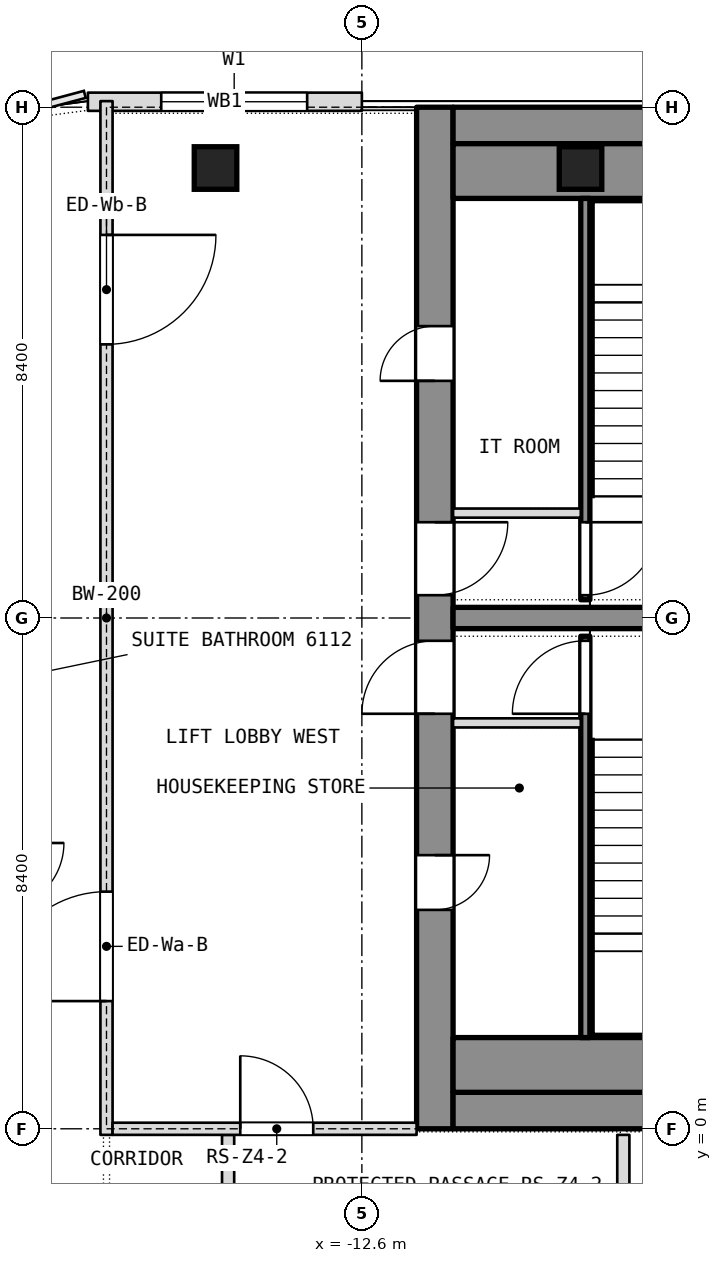
"""IFC4 building model, lengths in metres.
Left out: names, types, materials, properties, quantities, classifications, styles, units other than length and angle.
Written with IfcOpenShell. Run it as: python <this file> out.ifc"""

import sys

from ifc_helpers import new_model, si_unit, direction, frame, frame_2d, origin, origin_2d, place, context, subcontext, project, spatial, rectangle, extrude, element, fill, save


model = new_model("IFC4")
c1 = context("Model", 3, precision=1e-05, world=origin(), true_north=direction((0.0, 1.0)))
c2 = subcontext(c1, "Body", "Model", "MODEL_VIEW")
j1 = project(units=[si_unit("LENGTHUNIT", "METRE"), si_unit("PLANEANGLEUNIT", "RADIAN")], contexts=[c1])
p1 = place(None, origin())
s1 = spatial("IfcSite", under=j1, at=p1, CompositionType="ELEMENT")
p2 = place(p1, origin())
s2 = spatial("IfcBuilding", under=s1, at=p2, CompositionType="ELEMENT")
p3 = place(p2, frame((0.0, 0.0, 266.9)))
s3 = spatial("IfcBuildingStorey", under=s2, at=p3, CompositionType="ELEMENT", Elevation=266.9)
p4 = place(p3, frame((-11.4, 0.0, 0.0), z_axis=(0.0, 0.0, 1.0), x_axis=(0.0, 1.0, 0.0)))
e1 = element("IfcWall", 1, at=p4, inside=s3, PredefinedType="SHEAR", context=c2, shape_type="SweptSolid", body=[
    extrude(rectangle(XDim=16.8, YDim=0.6, at=frame_2d((8.4, 0.0))), origin(), (0.0, 0.0, 1.0), 3.6),
])
p5 = place(p4, frame((3.6, 0.0, 0.0)))
e2 = element("IfcOpeningElement", 2, at=p5, cuts=e1, PredefinedType="OPENING", context=c2, shape_type="SweptSolid", body=[
    extrude(rectangle(XDim=0.9, YDim=2.1, at=frame_2d((0.45, 1.05))), frame((0.0, 0.3, 0.0), z_axis=(0.0, -1.0, 0.0), x_axis=(1.0, 0.0, 0.0)), (0.0, 0.0, 1.0), 0.6),
])
p6 = place(p4, frame((6.825, 0.0, 0.0)))
e3 = element("IfcOpeningElement", 3, at=p6, cuts=e1, PredefinedType="OPENING", context=c2, shape_type="SweptSolid", body=[
    extrude(rectangle(XDim=1.2, YDim=2.1, at=frame_2d((0.6, 1.05))), frame((0.0, 0.3, 0.0), z_axis=(0.0, -1.0, 0.0), x_axis=(1.0, 0.0, 0.0)), (0.0, 0.0, 1.0), 0.6),
])
p7 = place(p4, frame((12.3, 0.0, 0.0)))
e4 = element("IfcOpeningElement", 4, at=p7, cuts=e1, PredefinedType="OPENING", context=c2, shape_type="SweptSolid", body=[
    extrude(rectangle(XDim=0.9, YDim=2.1, at=frame_2d((0.45, 1.05))), frame((0.0, 0.3, 0.0), z_axis=(0.0, -1.0, 0.0), x_axis=(1.0, 0.0, 0.0)), (0.0, 0.0, 1.0), 0.6),
])
p8 = place(p4, frame((8.775, 0.0, 0.0)))
e5 = element("IfcOpeningElement", 5, at=p8, cuts=e1, PredefinedType="OPENING", context=c2, shape_type="SweptSolid", body=[
    extrude(rectangle(XDim=1.2, YDim=2.1, at=frame_2d((0.6, 1.05))), frame((0.0, 0.3, 0.0), z_axis=(0.0, -1.0, 0.0), x_axis=(1.0, 0.0, 0.0)), (0.0, 0.0, 1.0), 0.6),
])
for number, where, z_axis, x_axis in (
    (6, (-11.1, 0.3, 0.0), (0.0, 0.0, 1.0), (1.0, 0.0, 0.0)),
    (7, (-11.1, 16.5, 0.0), (0.0, 0.0, 1.0), (1.0, 0.0, 0.0)),
):
    element("IfcWall", number, at=place(p3, frame(where, z_axis=z_axis, x_axis=x_axis)), inside=s3, PredefinedType="SHEAR", context=c2, shape_type="SweptSolid", body=[
        extrude(rectangle(XDim=22.2, YDim=0.6, at=frame_2d((11.1, 0.0))), origin(), (0.0, 0.0, 1.0), 3.6),
    ])
p9 = place(p3, frame((-11.1, 8.4, 0.0), z_axis=(0.0, 0.0, 1.0), x_axis=(1.0, 0.0, 0.0)))
e8 = element("IfcWall", 8, at=p9, inside=s3, PredefinedType="SHEAR", context=c2, shape_type="SweptSolid", body=[
    extrude(rectangle(XDim=6.725, YDim=0.35, at=frame_2d((3.363, 0.0))), origin(), (0.0, 0.0, 1.0), 3.6),
])
for number, where, z_axis, x_axis in (
    (9, (-15.007, 15.8, 0.0), (0.0, 0.0, 1.0), (1.0, 0.0, 0.0)),
    (10, (-9.004, 15.8, 0.0), (0.0, 0.0, 1.0), (1.0, 0.0, 0.0)),
):
    element("IfcColumn", number, at=place(p3, frame(where, z_axis=z_axis, x_axis=x_axis)), inside=s3, PredefinedType="COLUMN", context=c2, shape_type="SweptSolid", body=[
        extrude(rectangle(XDim=0.7, YDim=0.7, at=origin_2d()), origin(), (0.0, 0.0, 1.0), 3.6),
    ])
for number, where, z_axis, x_axis in (
    (11, (-8.3, -1.7, 0.0), (0.0, 0.0, 1.0), (0.0, 1.0, 0.0)),
    (12, (-14.8, -1.7, 0.0), (0.0, 0.0, 1.0), (0.0, 1.0, 0.0)),
):
    element("IfcWall", number, at=place(p3, frame(where, z_axis=z_axis, x_axis=x_axis)), inside=s3, PredefinedType="PARTITIONING", context=c2, shape_type="SweptSolid", body=[
        extrude(rectangle(XDim=1.6, YDim=0.2, at=frame_2d((0.8, 0.0))), origin(), (0.0, 0.0, 1.0), 3.34),
    ])
p10 = place(p3, frame((-12.6, 16.89, 0.0), z_axis=(0.0, 0.0, 1.0), x_axis=(-1.0, 0.0, 0.0)))
e13 = element("IfcWall", 13, at=p10, inside=s3, PredefinedType="NOTDEFINED", context=c2, shape_type="SweptSolid", body=[
    extrude(rectangle(XDim=4.506, YDim=0.3, at=frame_2d((2.253, 0.0))), origin(), (0.0, 0.0, 1.0), 3.6),
])
p11 = place(p10, frame((0.9, 0.0, 0.9)))
e14 = element("IfcOpeningElement", 14, at=p11, cuts=e13, PredefinedType="OPENING", context=c2, shape_type="SweptSolid", body=[
    extrude(rectangle(XDim=2.4, YDim=2.1, at=frame_2d((1.2, 1.05))), frame((0.0, 0.15, 0.0), z_axis=(0.0, -1.0, 0.0), x_axis=(1.0, 0.0, 0.0)), (0.0, 0.0, 1.0), 0.3),
])
for number, where, z_axis, x_axis in (
    (15, (-11.1, 1.05, 0.0), (0.0, 0.0, 1.0), (1.0, 0.0, 0.0)),
    (16, (-11.1, 15.75, 0.0), (0.0, 0.0, 1.0), (1.0, 0.0, 0.0)),
):
    element("IfcWall", number, at=place(p3, frame(where, z_axis=z_axis, x_axis=x_axis)), inside=s3, PredefinedType="PARTITIONING", context=c2, shape_type="SweptSolid", body=[
        extrude(rectangle(XDim=22.2, YDim=0.9, at=frame_2d((11.1, 0.0))), origin(), (0.0, 0.0, 1.0), 3.34),
    ])
p12 = place(p3, frame((-8.925, 1.5, 0.0), z_axis=(0.0, 0.0, 1.0), x_axis=(0.0, 1.0, 0.0)))
e17 = element("IfcWall", 17, at=p12, inside=s3, PredefinedType="SHEAR", context=c2, shape_type="SweptSolid", body=[
    extrude(rectangle(XDim=6.6, YDim=0.15, at=frame_2d((3.3, 0.0))), origin(), (0.0, 0.0, 1.0), 3.34),
])
p13 = place(p12, frame((5.325, 0.0, 0.0)))
e18 = element("IfcOpeningElement", 18, at=p13, cuts=e17, PredefinedType="OPENING", context=c2, shape_type="SweptSolid", body=[
    extrude(rectangle(XDim=1.2, YDim=2.1, at=frame_2d((0.6, 1.05))), frame((0.0, 0.075, 0.0), z_axis=(0.0, -1.0, 0.0), x_axis=(1.0, 0.0, 0.0)), (0.0, 0.0, 1.0), 0.15),
])
p14 = place(p3, frame((-11.1, 6.675, 0.0), z_axis=(0.0, 0.0, 1.0), x_axis=(1.0, 0.0, 0.0)))
e19 = element("IfcWall", 19, at=p14, inside=s3, PredefinedType="PARTITIONING", context=c2, shape_type="SweptSolid", body=[
    extrude(rectangle(XDim=2.1, YDim=0.15, at=frame_2d((1.05, 0.0))), origin(), (0.0, 0.0, 1.0), 3.34),
])
p15 = place(p3, frame((-8.925, 8.7, 0.0), z_axis=(0.0, 0.0, 1.0), x_axis=(0.0, 1.0, 0.0)))
e20 = element("IfcWall", 20, at=p15, inside=s3, PredefinedType="SHEAR", context=c2, shape_type="SweptSolid", body=[
    extrude(rectangle(XDim=6.6, YDim=0.15, at=frame_2d((3.3, 0.0))), origin(), (0.0, 0.0, 1.0), 3.34),
])
p16 = place(p15, frame((0.075, 0.0, 0.0)))
e21 = element("IfcOpeningElement", 21, at=p16, cuts=e20, PredefinedType="OPENING", context=c2, shape_type="SweptSolid", body=[
    extrude(rectangle(XDim=1.2, YDim=2.1, at=frame_2d((0.6, 1.05))), frame((0.0, 0.075, 0.0), z_axis=(0.0, -1.0, 0.0), x_axis=(1.0, 0.0, 0.0)), (0.0, 0.0, 1.0), 0.15),
])
p17 = place(p3, frame((-11.1, 10.125, 0.0), z_axis=(0.0, 0.0, 1.0), x_axis=(1.0, 0.0, 0.0)))
e22 = element("IfcWall", 22, at=p17, inside=s3, PredefinedType="PARTITIONING", context=c2, shape_type="SweptSolid", body=[
    extrude(rectangle(XDim=2.1, YDim=0.15, at=frame_2d((1.05, 0.0))), origin(), (0.0, 0.0, 1.0), 3.34),
])
p18 = place(p3, frame((-16.8, -0.1, 0.0), z_axis=(0.0, 0.0, 1.0), x_axis=(0.0, 1.0, 0.0)))
e23 = element("IfcWall", 23, at=p18, inside=s3, PredefinedType="PARTITIONING", context=c2, shape_type="SweptSolid", body=[
    extrude(rectangle(XDim=17.0, YDim=0.2, at=frame_2d((8.5, 0.0))), origin(), (0.0, 0.0, 1.0), 3.34),
])
p19 = place(p18, frame((2.2, 0.0, 0.0)))
e24 = element("IfcOpeningElement", 24, at=p19, cuts=e23, PredefinedType="OPENING", context=c2, shape_type="SweptSolid", body=[
    extrude(rectangle(XDim=1.8, YDim=2.1, at=frame_2d((0.9, 1.05))), frame((0.0, 0.1, 0.0), z_axis=(0.0, -1.0, 0.0), x_axis=(1.0, 0.0, 0.0)), (0.0, 0.0, 1.0), 0.2),
])
p20 = place(p18, frame((13.0, 0.0, 0.0)))
e25 = element("IfcOpeningElement", 25, at=p20, cuts=e23, PredefinedType="OPENING", context=c2, shape_type="SweptSolid", body=[
    extrude(rectangle(XDim=1.8, YDim=2.1, at=frame_2d((0.9, 1.05))), frame((0.0, 0.1, 0.0), z_axis=(0.0, -1.0, 0.0), x_axis=(1.0, 0.0, 0.0)), (0.0, 0.0, 1.0), 0.2),
])
p21 = place(p3, frame((-16.7, 0.0, 0.0), z_axis=(0.0, 0.0, 1.0), x_axis=(1.0, 0.0, 0.0)))
e26 = element("IfcWall", 26, at=p21, inside=s3, PredefinedType="PARTITIONING", context=c2, shape_type="SweptSolid", body=[
    extrude(rectangle(XDim=5.0, YDim=0.2, at=frame_2d((2.5, 0.0))), origin(), (0.0, 0.0, 1.0), 3.0),
])
p22 = place(p21, frame((2.1, 0.0, 0.0)))
e27 = element("IfcOpeningElement", 27, at=p22, cuts=e26, PredefinedType="OPENING", context=c2, shape_type="SweptSolid", body=[
    extrude(rectangle(XDim=1.2, YDim=2.1, at=frame_2d((0.6, 1.05))), frame((0.0, 0.1, 0.0), z_axis=(0.0, -1.0, 0.0), x_axis=(1.0, 0.0, 0.0)), (0.0, 0.0, 1.0), 0.2),
])
p23 = place(p11, origin())
e28 = element("IfcWindow", 28, at=p23, inside=s3, PartitioningType="SINGLE_PANEL", PredefinedType="WINDOW", context=c2, shape_type="SweptSolid", body=[
    extrude(rectangle(XDim=2.4, YDim=2.1, at=frame_2d((1.2, 1.05))), frame((0.0, 0.03, 0.0), z_axis=(0.0, -1.0, 0.0), x_axis=(1.0, 0.0, 0.0)), (0.0, 0.0, 1.0), 0.06),
])
fill(e14, e28)
p24 = place(p5, origin())
e29 = element("IfcDoor", 29, at=p24, inside=s3, OperationType="SINGLE_SWING_LEFT", PredefinedType="DOOR", context=c2, shape_type="SweptSolid", body=[
    extrude(rectangle(XDim=0.9, YDim=2.1, at=frame_2d((0.45, 1.05))), frame((0.0, 0.025, 0.0), z_axis=(0.0, -1.0, 0.0), x_axis=(1.0, 0.0, 0.0)), (0.0, 0.0, 1.0), 0.05),
])
fill(e2, e29)
p25 = place(p6, origin())
e30 = element("IfcDoor", 30, at=p25, inside=s3, OperationType="SINGLE_SWING_LEFT", PredefinedType="DOOR", context=c2, shape_type="SweptSolid", body=[
    extrude(rectangle(XDim=1.2, YDim=2.1, at=frame_2d((0.6, 1.05))), frame((0.0, 0.025, 0.0), z_axis=(0.0, -1.0, 0.0), x_axis=(1.0, 0.0, 0.0)), (0.0, 0.0, 1.0), 0.05),
])
fill(e3, e30)
p26 = place(p13, origin())
e31 = element("IfcDoor", 31, at=p26, inside=s3, OperationType="SINGLE_SWING_LEFT", PredefinedType="DOOR", context=c2, shape_type="SweptSolid", body=[
    extrude(rectangle(XDim=1.2, YDim=2.1, at=frame_2d((0.6, 1.05))), frame((0.0, 0.025, 0.0), z_axis=(0.0, -1.0, 0.0), x_axis=(1.0, 0.0, 0.0)), (0.0, 0.0, 1.0), 0.05),
])
fill(e18, e31)
p27 = place(p7, origin())
e32 = element("IfcDoor", 32, at=p27, inside=s3, OperationType="SINGLE_SWING_LEFT", PredefinedType="DOOR", context=c2, shape_type="SweptSolid", body=[
    extrude(rectangle(XDim=0.9, YDim=2.1, at=frame_2d((0.45, 1.05))), frame((0.0, 0.025, 0.0), z_axis=(0.0, -1.0, 0.0), x_axis=(1.0, 0.0, 0.0)), (0.0, 0.0, 1.0), 0.05),
])
fill(e4, e32)
p28 = place(p8, origin())
e33 = element("IfcDoor", 33, at=p28, inside=s3, OperationType="SINGLE_SWING_LEFT", PredefinedType="DOOR", context=c2, shape_type="SweptSolid", body=[
    extrude(rectangle(XDim=1.2, YDim=2.1, at=frame_2d((0.6, 1.05))), frame((0.0, 0.025, 0.0), z_axis=(0.0, -1.0, 0.0), x_axis=(1.0, 0.0, 0.0)), (0.0, 0.0, 1.0), 0.05),
])
fill(e5, e33)
p29 = place(p16, origin())
e34 = element("IfcDoor", 34, at=p29, inside=s3, OperationType="SINGLE_SWING_LEFT", PredefinedType="DOOR", context=c2, shape_type="SweptSolid", body=[
    extrude(rectangle(XDim=1.2, YDim=2.1, at=frame_2d((0.6, 1.05))), frame((0.0, 0.025, 0.0), z_axis=(0.0, -1.0, 0.0), x_axis=(1.0, 0.0, 0.0)), (0.0, 0.0, 1.0), 0.05),
])
fill(e21, e34)
p30 = place(p19, origin())
e35 = element("IfcDoor", 35, at=p30, inside=s3, OperationType="DOUBLE_DOOR_SINGLE_SWING", PredefinedType="DOOR", context=c2, shape_type="SweptSolid", body=[
    extrude(rectangle(XDim=1.8, YDim=2.1, at=frame_2d((0.9, 1.05))), frame((0.0, 0.025, 0.0), z_axis=(0.0, -1.0, 0.0), x_axis=(1.0, 0.0, 0.0)), (0.0, 0.0, 1.0), 0.05),
])
fill(e24, e35)
p31 = place(p20, origin())
e36 = element("IfcDoor", 36, at=p31, inside=s3, OperationType="DOUBLE_DOOR_SINGLE_SWING", PredefinedType="DOOR", context=c2, shape_type="SweptSolid", body=[
    extrude(rectangle(XDim=1.8, YDim=2.1, at=frame_2d((0.9, 1.05))), frame((0.0, 0.025, 0.0), z_axis=(0.0, -1.0, 0.0), x_axis=(1.0, 0.0, 0.0)), (0.0, 0.0, 1.0), 0.05),
])
fill(e25, e36)
p32 = place(p22, origin())
e37 = element("IfcDoor", 37, at=p32, inside=s3, OperationType="SINGLE_SWING_LEFT", PredefinedType="DOOR", context=c2, shape_type="SweptSolid", body=[
    extrude(rectangle(XDim=1.2, YDim=2.1, at=frame_2d((0.6, 1.05))), frame((0.0, 0.025, 0.0), z_axis=(0.0, -1.0, 0.0), x_axis=(1.0, 0.0, 0.0)), (0.0, 0.0, 1.0), 0.05),
])
fill(e27, e37)
save(model, sys.argv[1])
